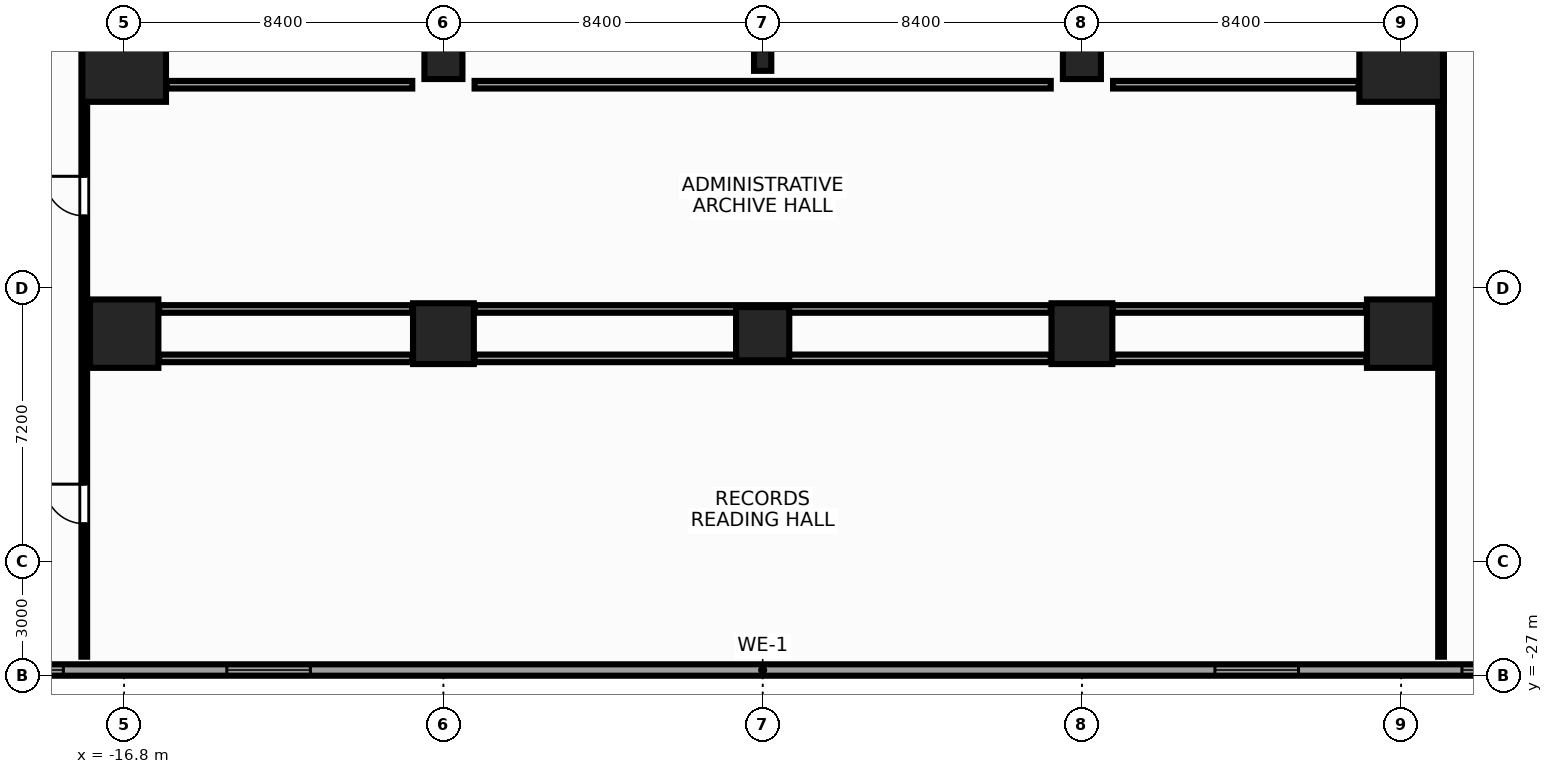
"""IFC4 building model, lengths in metres.
Left out: names, types, materials, properties, quantities, classifications, styles, units other than length and angle.
Written with IfcOpenShell. Run it as: python <this file> out.ifc"""

import sys

from ifc_helpers import new_model, si_unit, direction, frame, frame_2d, origin, origin_2d, place, context, subcontext, project, spatial, rectangle, hollow_rectangle, i_section, extrude, source, transform, mapped, element, fill, save


model = new_model("IFC4")
c1 = context("Model", 3, precision=1e-05, world=origin(), true_north=direction((0.0, 1.0)))
c2 = subcontext(c1, "Body", "Model", "MODEL_VIEW")
j1 = project(units=[si_unit("LENGTHUNIT", "METRE"), si_unit("PLANEANGLEUNIT", "RADIAN")], contexts=[c1])
p1 = place(None, origin())
s1 = spatial("IfcSite", under=j1, at=p1, CompositionType="ELEMENT")
p2 = place(p1, origin())
s2 = spatial("IfcBuilding", under=s1, at=p2, CompositionType="ELEMENT")
p3 = place(p2, frame((0.0, 0.0, 18.95)))
s3 = spatial("IfcBuildingStorey", under=s2, at=p3, CompositionType="ELEMENT", Elevation=18.95)
m1 = source(origin(), c2, "Body", "SweptSolid", [
    extrude(rectangle(XDim=1.8, YDim=1.8, at=origin_2d()), origin(), (0.0, 0.0, 1.0), 4.65),
])
p4 = place(p3, frame((-16.8, -18.0, 0.0), z_axis=(0.0, 0.0, 1.0), x_axis=(1.0, 0.0, 0.0)))
e1 = element("IfcColumn", 1, at=p4, inside=s3, PredefinedType="COLUMN", context=c2, shape_type="MappedRepresentation", body=[
    mapped(m1, transform((0.0, 0.0, 0.0), x_axis=(1.0, 0.0, 0.0), y_axis=(0.0, 1.0, 0.0), z_axis=(0.0, 0.0, 1.0), scale=1.0)),
])
m2 = source(origin(), c2, "Body", "SweptSolid", [
    extrude(rectangle(XDim=2.2, YDim=2.2, at=origin_2d()), origin(), (0.0, 0.0, 1.0), 4.65),
])
p5 = place(p3, frame((-16.8, -10.8, 0.0), z_axis=(0.0, 0.0, 1.0), x_axis=(1.0, 0.0, 0.0)))
e2 = element("IfcColumn", 2, at=p5, inside=s3, PredefinedType="COLUMN", context=c2, shape_type="MappedRepresentation", body=[
    mapped(m2, transform((0.0, 0.0, 0.0), x_axis=(1.0, 0.0, 0.0), y_axis=(0.0, 1.0, 0.0), z_axis=(0.0, 0.0, 1.0), scale=1.0)),
])
p6 = place(p3, frame((16.8, -18.0, 0.0), z_axis=(0.0, 0.0, 1.0), x_axis=(1.0, 0.0, 0.0)))
e3 = element("IfcColumn", 3, at=p6, inside=s3, PredefinedType="COLUMN", context=c2, shape_type="MappedRepresentation", body=[
    mapped(m1, transform((0.0, 0.0, 0.0), x_axis=(1.0, 0.0, 0.0), y_axis=(0.0, 1.0, 0.0), z_axis=(0.0, 0.0, 1.0), scale=1.0)),
])
p7 = place(p3, frame((16.8, -10.8, 0.0), z_axis=(0.0, 0.0, 1.0), x_axis=(1.0, 0.0, 0.0)))
e4 = element("IfcColumn", 4, at=p7, inside=s3, PredefinedType="COLUMN", context=c2, shape_type="MappedRepresentation", body=[
    mapped(m2, transform((0.0, 0.0, 0.0), x_axis=(1.0, 0.0, 0.0), y_axis=(0.0, 1.0, 0.0), z_axis=(0.0, 0.0, 1.0), scale=1.0)),
])
m3 = source(origin(), c2, "Body", "SweptSolid", [
    extrude(rectangle(XDim=1.6, YDim=1.6, at=origin_2d()), origin(), (0.0, 0.0, 1.0), 4.65),
])
p8 = place(p3, frame((-8.4, -18.0, 0.0), z_axis=(0.0, 0.0, 1.0), x_axis=(1.0, 0.0, 0.0)))
e5 = element("IfcColumn", 5, at=p8, inside=s3, PredefinedType="COLUMN", context=c2, shape_type="MappedRepresentation", body=[
    mapped(m3, transform((0.0, 0.0, 0.0), x_axis=(1.0, 0.0, 0.0), y_axis=(0.0, 1.0, 0.0), z_axis=(0.0, 0.0, 1.0), scale=1.0)),
])
m4 = source(origin(), c2, "Body", "SweptSolid", [
    extrude(hollow_rectangle(XDim=1.0, YDim=1.0, WallThickness=0.045, at=origin_2d()), origin(), (0.0, 0.0, 1.0), 4.65),
])
p9 = place(p3, frame((-8.4, -10.8, 0.0), z_axis=(0.0, 0.0, 1.0), x_axis=(1.0, 0.0, 0.0)))
e6 = element("IfcColumn", 6, at=p9, inside=s3, PredefinedType="COLUMN", context=c2, shape_type="MappedRepresentation", body=[
    mapped(m4, transform((0.0, 0.0, 0.0), x_axis=(1.0, 0.0, 0.0), y_axis=(0.0, 1.0, 0.0), z_axis=(0.0, 0.0, 1.0), scale=1.0)),
])
p10 = place(p3, frame((8.4, -18.0, 0.0), z_axis=(0.0, 0.0, 1.0), x_axis=(1.0, 0.0, 0.0)))
e7 = element("IfcColumn", 7, at=p10, inside=s3, PredefinedType="COLUMN", context=c2, shape_type="MappedRepresentation", body=[
    mapped(m3, transform((0.0, 0.0, 0.0), x_axis=(1.0, 0.0, 0.0), y_axis=(0.0, 1.0, 0.0), z_axis=(0.0, 0.0, 1.0), scale=1.0)),
])
p11 = place(p3, frame((8.4, -10.8, 0.0), z_axis=(0.0, 0.0, 1.0), x_axis=(1.0, 0.0, 0.0)))
e8 = element("IfcColumn", 8, at=p11, inside=s3, PredefinedType="COLUMN", context=c2, shape_type="MappedRepresentation", body=[
    mapped(m4, transform((0.0, 0.0, 0.0), x_axis=(1.0, 0.0, 0.0), y_axis=(0.0, 1.0, 0.0), z_axis=(0.0, 0.0, 1.0), scale=1.0)),
])
m5 = source(origin(), c2, "Body", "SweptSolid", [
    extrude(rectangle(XDim=1.4, YDim=1.4, at=origin_2d()), origin(), (0.0, 0.0, 1.0), 4.65),
])
p12 = place(p3, frame((0.0, -18.0, 0.0), z_axis=(0.0, 0.0, 1.0), x_axis=(1.0, 0.0, 0.0)))
e9 = element("IfcColumn", 9, at=p12, inside=s3, PredefinedType="COLUMN", context=c2, shape_type="MappedRepresentation", body=[
    mapped(m5, transform((0.0, 0.0, 0.0), x_axis=(1.0, 0.0, 0.0), y_axis=(0.0, 1.0, 0.0), z_axis=(0.0, 0.0, 1.0), scale=1.0)),
])
m6 = source(origin(), c2, "Body", "SweptSolid", [
    extrude(i_section(OverallWidth=0.454, OverallDepth=0.569, WebThickness=0.045, FlangeThickness=0.064, at=origin_2d()), origin(), (0.0, 0.0, 1.0), 4.97),
])
p13 = place(p3, frame((0.0, -10.8, -0.32), z_axis=(0.0, 0.0, 1.0), x_axis=(1.0, 0.0, 0.0)))
e10 = element("IfcColumn", 10, at=p13, inside=s3, PredefinedType="COLUMN", context=c2, shape_type="MappedRepresentation", body=[
    mapped(m6, transform((0.0, 0.0, 0.0), x_axis=(1.0, 0.0, 0.0), y_axis=(0.0, 1.0, 0.0), z_axis=(0.0, 0.0, 1.0), scale=1.0)),
])
m7 = source(origin(), c2, "Body", "SweptSolid", [
    extrude(rectangle(XDim=57.7, YDim=0.3, at=frame_2d((28.85, 0.0))), origin(), (0.0, 0.0, 1.0), 3.91),
])
p14 = place(p3, frame((28.85, -26.85, 0.0), z_axis=(0.0, 0.0, 1.0), x_axis=(-1.0, 0.0, 0.0)))
e11 = element("IfcWall", 11, at=p14, inside=s3, PredefinedType="STANDARD", context=c2, shape_type="MappedRepresentation", body=[
    mapped(m7, transform((0.0, 0.0, 0.0), x_axis=(1.0, 0.0, 0.0), y_axis=(0.0, 1.0, 0.0), z_axis=(0.0, 0.0, 1.0), scale=1.0)),
])
p15 = place(p14, frame((8.25, 0.0, 0.9)))
e12 = element("IfcOpeningElement", 12, at=p15, cuts=e11, PredefinedType="OPENING", context=c2, shape_type="SweptSolid", body=[
    extrude(rectangle(XDim=2.2, YDim=2.5, at=frame_2d((1.1, 1.25))), frame((0.0, 0.162, 0.0), z_axis=(0.0, -1.0, 0.0), x_axis=(1.0, 0.0, 0.0)), (0.0, 0.0, 1.0), 0.324),
])
p16 = place(p14, frame((14.75, 0.0, 0.9)))
e13 = element("IfcOpeningElement", 13, at=p16, cuts=e11, PredefinedType="OPENING", context=c2, shape_type="SweptSolid", body=[
    extrude(rectangle(XDim=2.2, YDim=2.5, at=frame_2d((1.1, 1.25))), frame((0.0, 0.162, 0.0), z_axis=(0.0, -1.0, 0.0), x_axis=(1.0, 0.0, 0.0)), (0.0, 0.0, 1.0), 0.324),
])
p17 = place(p14, frame((40.75, 0.0, 0.9)))
e14 = element("IfcOpeningElement", 14, at=p17, cuts=e11, PredefinedType="OPENING", context=c2, shape_type="SweptSolid", body=[
    extrude(rectangle(XDim=2.2, YDim=2.5, at=frame_2d((1.1, 1.25))), frame((0.0, 0.162, 0.0), z_axis=(0.0, -1.0, 0.0), x_axis=(1.0, 0.0, 0.0)), (0.0, 0.0, 1.0), 0.324),
])
p18 = place(p14, frame((47.25, 0.0, 0.9)))
e15 = element("IfcOpeningElement", 15, at=p18, cuts=e11, PredefinedType="OPENING", context=c2, shape_type="SweptSolid", body=[
    extrude(rectangle(XDim=2.2, YDim=2.5, at=frame_2d((1.1, 1.25))), frame((0.0, 0.162, 0.0), z_axis=(0.0, -1.0, 0.0), x_axis=(1.0, 0.0, 0.0)), (0.0, 0.0, 1.0), 0.324),
])
m8 = source(origin(), c2, "Body", "SweptSolid", [
    extrude(rectangle(XDim=33.88, YDim=0.15, at=frame_2d((16.94, 0.0))), origin(), (0.0, 0.0, 1.0), 3.795),
])
p19 = place(p3, frame((-17.85, -26.5, 0.0), z_axis=(0.0, 0.0, 1.0), x_axis=(0.0, 1.0, 0.0)))
e16 = element("IfcWall", 16, at=p19, inside=s3, PredefinedType="PARTITIONING", context=c2, shape_type="MappedRepresentation", body=[
    mapped(m8, transform((0.0, 0.0, 0.0), x_axis=(1.0, 0.0, 0.0), y_axis=(0.0, 1.0, 0.0), z_axis=(0.0, 0.0, 1.0), scale=1.0)),
])
p20 = place(p19, frame((11.6, 0.0, 0.0)))
e17 = element("IfcOpeningElement", 17, at=p20, cuts=e16, PredefinedType="OPENING", context=c2, shape_type="SweptSolid", body=[
    extrude(rectangle(XDim=1.04, YDim=2.2, at=frame_2d((0.52, 1.1))), frame((0.0, 0.087, 0.0), z_axis=(0.0, -1.0, 0.0), x_axis=(1.0, 0.0, 0.0)), (0.0, 0.0, 1.0), 0.174),
])
p21 = place(p19, frame((3.5, 0.0, 0.0)))
e18 = element("IfcOpeningElement", 18, at=p21, cuts=e16, PredefinedType="OPENING", context=c2, shape_type="SweptSolid", body=[
    extrude(rectangle(XDim=1.04, YDim=2.2, at=frame_2d((0.52, 1.1))), frame((0.0, 0.087, 0.0), z_axis=(0.0, -1.0, 0.0), x_axis=(1.0, 0.0, 0.0)), (0.0, 0.0, 1.0), 0.174),
])
p22 = place(p3, frame((17.85, -26.5, 0.0), z_axis=(0.0, 0.0, 1.0), x_axis=(0.0, 1.0, 0.0)))
e19 = element("IfcWall", 19, at=p22, inside=s3, PredefinedType="PARTITIONING", context=c2, shape_type="MappedRepresentation", body=[
    mapped(m8, transform((0.0, 0.0, 0.0), x_axis=(1.0, 0.0, 0.0), y_axis=(0.0, 1.0, 0.0), z_axis=(0.0, 0.0, 1.0), scale=1.0)),
])
m9 = source(origin(), c2, "Body", "SweptSolid", [
    extrude(rectangle(XDim=6.46, YDim=0.2, at=frame_2d((3.23, 0.0))), origin(), (0.0, 0.0, 1.0), 4.41),
])
p23 = place(p3, frame((-15.68, -11.45, 0.0), z_axis=(0.0, 0.0, 1.0), x_axis=(1.0, 0.0, 0.0)))
e20 = element("IfcWall", 20, at=p23, inside=s3, PredefinedType="PARTITIONING", context=c2, shape_type="MappedRepresentation", body=[
    mapped(m9, transform((0.0, 0.0, 0.0), x_axis=(1.0, 0.0, 0.0), y_axis=(0.0, 1.0, 0.0), z_axis=(0.0, 0.0, 1.0), scale=1.0)),
])
m10 = source(origin(), c2, "Body", "SweptSolid", [
    extrude(rectangle(XDim=15.16, YDim=0.2, at=frame_2d((7.58, 0.0))), origin(), (0.0, 0.0, 1.0), 3.995),
])
p24 = place(p3, frame((-7.58, -11.45, 0.0), z_axis=(0.0, 0.0, 1.0), x_axis=(1.0, 0.0, 0.0)))
e21 = element("IfcWall", 21, at=p24, inside=s3, PredefinedType="PARTITIONING", context=c2, shape_type="MappedRepresentation", body=[
    mapped(m10, transform((0.0, 0.0, 0.0), x_axis=(1.0, 0.0, 0.0), y_axis=(0.0, 1.0, 0.0), z_axis=(0.0, 0.0, 1.0), scale=1.0)),
])
p25 = place(p3, frame((9.22, -11.45, 0.0), z_axis=(0.0, 0.0, 1.0), x_axis=(1.0, 0.0, 0.0)))
e22 = element("IfcWall", 22, at=p25, inside=s3, PredefinedType="PARTITIONING", context=c2, shape_type="MappedRepresentation", body=[
    mapped(m9, transform((0.0, 0.0, 0.0), x_axis=(1.0, 0.0, 0.0), y_axis=(0.0, 1.0, 0.0), z_axis=(0.0, 0.0, 1.0), scale=1.0)),
])
m11 = source(origin(), c2, "Body", "SweptSolid", [
    extrude(rectangle(XDim=6.66, YDim=0.2, at=frame_2d((3.33, 0.0))), origin(), (0.0, 0.0, 1.0), 4.41),
])
p26 = place(p3, frame((-15.88, -17.35, 0.0), z_axis=(0.0, 0.0, 1.0), x_axis=(1.0, 0.0, 0.0)))
e23 = element("IfcWall", 23, at=p26, inside=s3, PredefinedType="PARTITIONING", context=c2, shape_type="MappedRepresentation", body=[
    mapped(m11, transform((0.0, 0.0, 0.0), x_axis=(1.0, 0.0, 0.0), y_axis=(0.0, 1.0, 0.0), z_axis=(0.0, 0.0, 1.0), scale=1.0)),
])
p27 = place(p3, frame((-7.58, -17.35, 0.0), z_axis=(0.0, 0.0, 1.0), x_axis=(1.0, 0.0, 0.0)))
e24 = element("IfcWall", 24, at=p27, inside=s3, PredefinedType="PARTITIONING", context=c2, shape_type="MappedRepresentation", body=[
    mapped(m10, transform((0.0, 0.0, 0.0), x_axis=(1.0, 0.0, 0.0), y_axis=(0.0, 1.0, 0.0), z_axis=(0.0, 0.0, 1.0), scale=1.0)),
])
for number, where, z_axis, x_axis in (
    (25, (9.22, -17.35, 0.0), (0.0, 0.0, 1.0), (1.0, 0.0, 0.0)),
    (26, (-15.88, -18.65, 0.0), (0.0, 0.0, 1.0), (1.0, 0.0, 0.0)),
):
    element("IfcWall", number, at=place(p3, frame(where, z_axis=z_axis, x_axis=x_axis)), inside=s3, PredefinedType="PARTITIONING", context=c2, shape_type="MappedRepresentation", body=[
        mapped(m11, transform((0.0, 0.0, 0.0), x_axis=(1.0, 0.0, 0.0), y_axis=(0.0, 1.0, 0.0), z_axis=(0.0, 0.0, 1.0), scale=1.0)),
    ])
m12 = source(origin(), c2, "Body", "SweptSolid", [
    extrude(rectangle(XDim=15.16, YDim=0.2, at=frame_2d((7.58, 0.0))), origin(), (0.0, 0.0, 1.0), 4.41),
])
p28 = place(p3, frame((-7.58, -18.65, 0.0), z_axis=(0.0, 0.0, 1.0), x_axis=(1.0, 0.0, 0.0)))
e27 = element("IfcWall", 27, at=p28, inside=s3, PredefinedType="PARTITIONING", context=c2, shape_type="MappedRepresentation", body=[
    mapped(m12, transform((0.0, 0.0, 0.0), x_axis=(1.0, 0.0, 0.0), y_axis=(0.0, 1.0, 0.0), z_axis=(0.0, 0.0, 1.0), scale=1.0)),
])
p29 = place(p3, frame((9.22, -18.65, 0.0), z_axis=(0.0, 0.0, 1.0), x_axis=(1.0, 0.0, 0.0)))
e28 = element("IfcWall", 28, at=p29, inside=s3, PredefinedType="PARTITIONING", context=c2, shape_type="MappedRepresentation", body=[
    mapped(m11, transform((0.0, 0.0, 0.0), x_axis=(1.0, 0.0, 0.0), y_axis=(0.0, 1.0, 0.0), z_axis=(0.0, 0.0, 1.0), scale=1.0)),
])
m13 = source(origin(), c2, "Body", "SweptSolid", [
    extrude(rectangle(XDim=2.2, YDim=2.5, at=frame_2d((1.1, 1.25))), frame((0.0, 0.03, 0.0), z_axis=(0.0, -1.0, 0.0), x_axis=(1.0, 0.0, 0.0)), (0.0, 0.0, 1.0), 0.06),
])
p30 = place(p15, origin())
e29 = element("IfcWindow", 29, at=p30, inside=s3, PartitioningType="SINGLE_PANEL", PredefinedType="WINDOW", context=c2, shape_type="MappedRepresentation", body=[
    mapped(m13, transform((0.0, 0.0, 0.0), x_axis=(1.0, 0.0, 0.0), y_axis=(0.0, 1.0, 0.0), z_axis=(0.0, 0.0, 1.0), scale=1.0)),
])
fill(e12, e29)
p31 = place(p16, origin())
e30 = element("IfcWindow", 30, at=p31, inside=s3, PartitioningType="SINGLE_PANEL", PredefinedType="WINDOW", context=c2, shape_type="MappedRepresentation", body=[
    mapped(m13, transform((0.0, 0.0, 0.0), x_axis=(1.0, 0.0, 0.0), y_axis=(0.0, 1.0, 0.0), z_axis=(0.0, 0.0, 1.0), scale=1.0)),
])
fill(e13, e30)
p32 = place(p17, origin())
e31 = element("IfcWindow", 31, at=p32, inside=s3, PartitioningType="SINGLE_PANEL", PredefinedType="WINDOW", context=c2, shape_type="MappedRepresentation", body=[
    mapped(m13, transform((0.0, 0.0, 0.0), x_axis=(1.0, 0.0, 0.0), y_axis=(0.0, 1.0, 0.0), z_axis=(0.0, 0.0, 1.0), scale=1.0)),
])
fill(e14, e31)
p33 = place(p18, origin())
e32 = element("IfcWindow", 32, at=p33, inside=s3, PartitioningType="SINGLE_PANEL", PredefinedType="WINDOW", context=c2, shape_type="MappedRepresentation", body=[
    mapped(m13, transform((0.0, 0.0, 0.0), x_axis=(1.0, 0.0, 0.0), y_axis=(0.0, 1.0, 0.0), z_axis=(0.0, 0.0, 1.0), scale=1.0)),
])
fill(e15, e32)
m14 = source(origin(), c2, "Body", "SweptSolid", [
    extrude(rectangle(XDim=1.04, YDim=2.2, at=frame_2d((0.52, 1.1))), frame((0.0, 0.025, 0.0), z_axis=(0.0, -1.0, 0.0), x_axis=(1.0, 0.0, 0.0)), (0.0, 0.0, 1.0), 0.05),
])
p34 = place(p20, origin())
e33 = element("IfcDoor", 33, at=p34, inside=s3, OperationType="SINGLE_SWING_RIGHT", PredefinedType="DOOR", context=c2, shape_type="MappedRepresentation", body=[
    mapped(m14, transform((0.0, 0.0, 0.0), x_axis=(1.0, 0.0, 0.0), y_axis=(0.0, 1.0, 0.0), z_axis=(0.0, 0.0, 1.0), scale=1.0)),
])
fill(e17, e33)
p35 = place(p21, origin())
e34 = element("IfcDoor", 34, at=p35, inside=s3, OperationType="SINGLE_SWING_RIGHT", PredefinedType="DOOR", context=c2, shape_type="MappedRepresentation", body=[
    mapped(m14, transform((0.0, 0.0, 0.0), x_axis=(1.0, 0.0, 0.0), y_axis=(0.0, 1.0, 0.0), z_axis=(0.0, 0.0, 1.0), scale=1.0)),
])
fill(e18, e34)
save(model, sys.argv[1])
